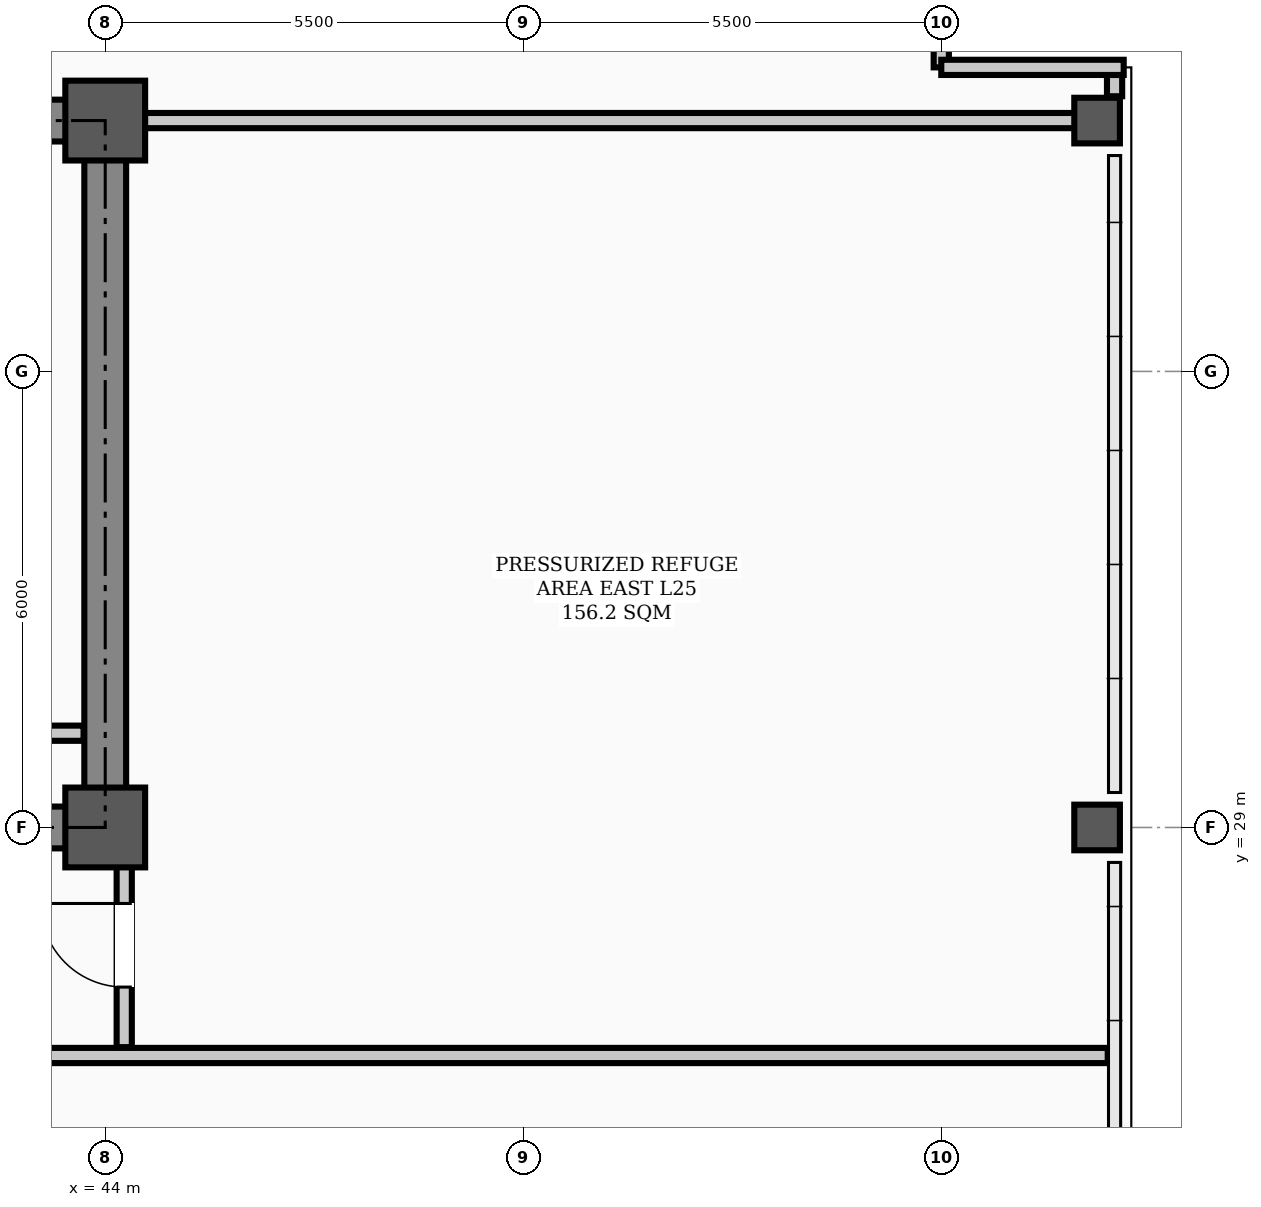
"""IFC4 building model, lengths in metres.
Left out: names, types, materials, properties, quantities, classifications, styles, units other than length and angle.
Written with IfcOpenShell. Run it as: python <this file> out.ifc"""

import sys

from ifc_helpers import new_model, si_unit, direction, frame, frame_2d, origin, origin_2d, place, context, subcontext, project, spatial, rectangle, hollow_rectangle, extrude, element, fill, save


model = new_model("IFC4")
c1 = context("Model", 3, precision=1e-05, world=origin(), true_north=direction((0.0, 1.0)))
c2 = subcontext(c1, "Body", "Model", "MODEL_VIEW")
j1 = project(units=[si_unit("LENGTHUNIT", "METRE"), si_unit("PLANEANGLEUNIT", "RADIAN")], contexts=[c1])
p1 = place(None, origin())
s1 = spatial("IfcSite", under=j1, at=p1, CompositionType="ELEMENT")
p2 = place(p1, origin())
s2 = spatial("IfcBuilding", under=s1, at=p2, CompositionType="ELEMENT")
p3 = place(p2, frame((0.0, 0.0, 100.6)))
s3 = spatial("IfcBuildingStorey", under=s2, at=p3, CompositionType="ELEMENT", Elevation=100.6)
for number, where, z_axis, x_axis in (
    (1, (44.0, 29.0, 0.0), (0.0, 0.0, 1.0), (1.0, 0.0, 0.0)),
    (2, (44.0, 38.3, 0.0), (0.0, 0.0, 1.0), (1.0, 0.0, 0.0)),
):
    element("IfcColumn", number, at=place(p3, frame(where, z_axis=z_axis, x_axis=x_axis)), inside=s3, PredefinedType="COLUMN", context=c2, shape_type="SweptSolid", body=[
        extrude(hollow_rectangle(XDim=1.05, YDim=1.05, WallThickness=0.038, InnerFilletRadius=0.019, OuterFilletRadius=0.057, at=origin_2d()), origin(), (0.0, 0.0, 1.0), 5.4),
    ])
for number, where, z_axis, x_axis in (
    (3, (57.05, 29.0, 0.0), (0.0, 0.0, 1.0), (1.0, 0.0, 0.0)),
    (4, (57.05, 38.3, 0.0), (0.0, 0.0, 1.0), (1.0, 0.0, 0.0)),
):
    element("IfcColumn", number, at=place(p3, frame(where, z_axis=z_axis, x_axis=x_axis)), inside=s3, PredefinedType="COLUMN", context=c2, shape_type="SweptSolid", body=[
        extrude(hollow_rectangle(XDim=0.6, YDim=0.6, WallThickness=0.026, InnerFilletRadius=0.013, OuterFilletRadius=0.039, at=origin_2d()), origin(), (0.0, 0.0, 1.0), 5.4),
    ])
p4 = place(p3, frame((57.28, 38.62, 0.0), z_axis=(0.0, 0.0, 1.0), x_axis=(0.0, 1.0, 0.0)))
e5 = element("IfcWall", 5, at=p4, inside=s3, PredefinedType="PARAPET", context=c2, shape_type="SweptSolid", body=[
    extrude(rectangle(XDim=0.28, YDim=0.2, at=frame_2d((0.14, 0.0))), origin(), (0.0, 0.0, 1.0), 1.2),
])
for number, where, z_axis, x_axis in (
    (6, (55.0, 41.4, 0.0), (0.0, 0.0, 1.0), (0.0, -1.0, 0.0)),
    (7, (55.0, 39.0, 0.0), (0.0, 0.0, 1.0), (1.0, 0.0, 0.0)),
):
    element("IfcWall", number, at=place(p3, frame(where, z_axis=z_axis, x_axis=x_axis)), inside=s3, PredefinedType="PARAPET", context=c2, shape_type="SweptSolid", body=[
        extrude(rectangle(XDim=2.4, YDim=0.2, at=frame_2d((1.2, 0.0))), origin(), (0.0, 0.0, 1.0), 1.2),
    ])
p5 = place(p3, frame((13.5, 29.0, 0.0), z_axis=(0.0, 0.0, 1.0), x_axis=(1.0, 0.0, 0.0)))
e8 = element("IfcWall", 8, at=p5, inside=s3, PredefinedType="SHEAR", context=c2, shape_type="SweptSolid", body=[
    extrude(rectangle(XDim=30.5, YDim=0.55, at=frame_2d((15.25, 0.0))), origin(), (0.0, 0.0, 1.0), 5.22),
])
p6 = place(p5, frame((1.75, 0.0, 0.0)))
e9 = element("IfcOpeningElement", 9, at=p6, cuts=e8, PredefinedType="OPENING", context=c2, shape_type="SweptSolid", body=[
    extrude(rectangle(XDim=1.1, YDim=2.08, at=frame_2d((0.55, 1.04))), frame((0.0, 0.285, 0.0), z_axis=(0.0, -1.0, 0.0), x_axis=(1.0, 0.0, 0.0)), (0.0, 0.0, 1.0), 0.57),
])
p7 = place(p5, frame((26.7, 0.0, 0.0)))
e10 = element("IfcOpeningElement", 10, at=p7, cuts=e8, PredefinedType="OPENING", context=c2, shape_type="SweptSolid", body=[
    extrude(rectangle(XDim=1.1, YDim=2.08, at=frame_2d((0.55, 1.04))), frame((0.0, 0.285, 0.0), z_axis=(0.0, -1.0, 0.0), x_axis=(1.0, 0.0, 0.0)), (0.0, 0.0, 1.0), 0.57),
])
p8 = place(p5, frame((6.8, 0.0, 0.0)))
e11 = element("IfcOpeningElement", 11, at=p8, cuts=e8, PredefinedType="OPENING", context=c2, shape_type="SweptSolid", body=[
    extrude(rectangle(XDim=1.1, YDim=2.08, at=frame_2d((0.55, 1.04))), frame((0.0, 0.285, 0.0), z_axis=(0.0, -1.0, 0.0), x_axis=(1.0, 0.0, 0.0)), (0.0, 0.0, 1.0), 0.57),
])
p9 = place(p5, frame((13.2, 0.0, 0.0)))
e12 = element("IfcOpeningElement", 12, at=p9, cuts=e8, PredefinedType="OPENING", context=c2, shape_type="SweptSolid", body=[
    extrude(rectangle(XDim=1.6, YDim=2.08, at=frame_2d((0.8, 1.04))), frame((0.0, 0.285, 0.0), z_axis=(0.0, -1.0, 0.0), x_axis=(1.0, 0.0, 0.0)), (0.0, 0.0, 1.0), 0.57),
])
p10 = place(p5, frame((19.5, 0.0, 0.0)))
e13 = element("IfcOpeningElement", 13, at=p10, cuts=e8, PredefinedType="OPENING", context=c2, shape_type="SweptSolid", body=[
    extrude(rectangle(XDim=0.9, YDim=2.08, at=frame_2d((0.45, 1.04))), frame((0.0, 0.285, 0.0), z_axis=(0.0, -1.0, 0.0), x_axis=(1.0, 0.0, 0.0)), (0.0, 0.0, 1.0), 0.57),
])
p11 = place(p5, frame((21.55, 0.0, 0.0)))
e14 = element("IfcOpeningElement", 14, at=p11, cuts=e8, PredefinedType="OPENING", context=c2, shape_type="SweptSolid", body=[
    extrude(rectangle(XDim=0.9, YDim=2.08, at=frame_2d((0.45, 1.04))), frame((0.0, 0.285, 0.0), z_axis=(0.0, -1.0, 0.0), x_axis=(1.0, 0.0, 0.0)), (0.0, 0.0, 1.0), 0.57),
])
p12 = place(p3, frame((13.5, 38.3, 0.0), z_axis=(0.0, 0.0, 1.0), x_axis=(1.0, 0.0, 0.0)))
e15 = element("IfcWall", 15, at=p12, inside=s3, PredefinedType="SHEAR", context=c2, shape_type="SweptSolid", body=[
    extrude(rectangle(XDim=30.5, YDim=0.55, at=frame_2d((15.25, 0.0))), origin(), (0.0, 0.0, 1.0), 5.22),
])
p13 = place(p3, frame((44.0, 29.35, 0.0), z_axis=(0.0, 0.0, 1.0), x_axis=(0.0, 1.0, 0.0)))
e16 = element("IfcWall", 16, at=p13, inside=s3, PredefinedType="SHEAR", context=c2, shape_type="SweptSolid", body=[
    extrude(rectangle(XDim=8.6, YDim=0.55, at=frame_2d((4.3, 0.0))), origin(), (0.0, 0.0, 1.0), 5.22),
])
p14 = place(p3, frame((42.4, 30.24, 0.0), z_axis=(0.0, 0.0, 1.0), x_axis=(1.0, 0.0, 0.0)))
e17 = element("IfcWall", 17, at=p14, inside=s3, PredefinedType="STANDARD", context=c2, shape_type="SweptSolid", body=[
    extrude(rectangle(XDim=1.315, YDim=0.2, at=frame_2d((0.658, 0.0))), origin(), (0.0, 0.0, 1.0), 4.6),
])
p15 = place(p3, frame((7.81, 26.0, 0.0), z_axis=(0.0, 0.0, 1.0), x_axis=(1.0, 0.0, 0.0)))
e18 = element("IfcWall", 18, at=p15, inside=s3, PredefinedType="STANDARD", context=c2, shape_type="SweptSolid", body=[
    extrude(rectangle(XDim=49.38, YDim=0.2, at=frame_2d((24.69, 0.0))), origin(), (0.0, 0.0, 1.0), 4.6),
])
p16 = place(p15, frame((10.84, 0.0, 0.0)))
e19 = element("IfcOpeningElement", 19, at=p16, cuts=e18, PredefinedType="OPENING", context=c2, shape_type="SweptSolid", body=[
    extrude(rectangle(XDim=1.1, YDim=2.08, at=frame_2d((0.55, 1.04))), frame((0.0, 0.11, 0.0), z_axis=(0.0, -1.0, 0.0), x_axis=(1.0, 0.0, 0.0)), (0.0, 0.0, 1.0), 0.22),
])
p17 = place(p15, frame((18.89, 0.0, 0.0)))
e20 = element("IfcOpeningElement", 20, at=p17, cuts=e18, PredefinedType="OPENING", context=c2, shape_type="SweptSolid", body=[
    extrude(rectangle(XDim=1.6, YDim=2.08, at=frame_2d((0.8, 1.04))), frame((0.0, 0.11, 0.0), z_axis=(0.0, -1.0, 0.0), x_axis=(1.0, 0.0, 0.0)), (0.0, 0.0, 1.0), 0.22),
])
p18 = place(p15, frame((25.89, 0.0, 0.0)))
e21 = element("IfcOpeningElement", 21, at=p18, cuts=e18, PredefinedType="OPENING", context=c2, shape_type="SweptSolid", body=[
    extrude(rectangle(XDim=1.1, YDim=2.08, at=frame_2d((0.55, 1.04))), frame((0.0, 0.11, 0.0), z_axis=(0.0, -1.0, 0.0), x_axis=(1.0, 0.0, 0.0)), (0.0, 0.0, 1.0), 0.22),
])
p19 = place(p15, frame((32.39, 0.0, 0.0)))
e22 = element("IfcOpeningElement", 22, at=p19, cuts=e18, PredefinedType="OPENING", context=c2, shape_type="SweptSolid", body=[
    extrude(rectangle(XDim=1.1, YDim=2.08, at=frame_2d((0.55, 1.04))), frame((0.0, 0.11, 0.0), z_axis=(0.0, -1.0, 0.0), x_axis=(1.0, 0.0, 0.0)), (0.0, 0.0, 1.0), 0.22),
])
p20 = place(p3, frame((44.0, 38.3, 0.0), z_axis=(0.0, 0.0, 1.0), x_axis=(1.0, 0.0, 0.0)))
e23 = element("IfcWall", 23, at=p20, inside=s3, PredefinedType="STANDARD", context=c2, shape_type="SweptSolid", body=[
    extrude(rectangle(XDim=13.19, YDim=0.2, at=frame_2d((6.595, 0.0))), origin(), (0.0, 0.0, 1.0), 4.5),
])
p21 = place(p3, frame((44.25, 26.11, 0.0), z_axis=(0.0, 0.0, 1.0), x_axis=(0.0, 1.0, 0.0)))
e24 = element("IfcWall", 24, at=p21, inside=s3, PredefinedType="STANDARD", context=c2, shape_type="SweptSolid", body=[
    extrude(rectangle(XDim=3.24, YDim=0.2, at=frame_2d((1.62, 0.0))), origin(), (0.0, 0.0, 1.0), 4.5),
])
p22 = place(p21, frame((0.79, 0.0, 0.0)))
e25 = element("IfcOpeningElement", 25, at=p22, cuts=e24, PredefinedType="OPENING", context=c2, shape_type="SweptSolid", body=[
    extrude(rectangle(XDim=1.1, YDim=2.08, at=frame_2d((0.55, 1.04))), frame((0.0, 0.11, 0.0), z_axis=(0.0, -1.0, 0.0), x_axis=(1.0, 0.0, 0.0)), (0.0, 0.0, 1.0), 0.22),
])
p23 = place(p22, origin())
e26 = element("IfcDoor", 26, at=p23, inside=s3, OperationType="SINGLE_SWING_RIGHT", PredefinedType="DOOR", context=c2, shape_type="SweptSolid", body=[
    extrude(rectangle(XDim=1.1, YDim=2.08, at=frame_2d((0.55, 1.04))), frame((0.0, 0.025, 0.0), z_axis=(0.0, -1.0, 0.0), x_axis=(1.0, 0.0, 0.0)), (0.0, 0.0, 1.0), 0.05),
])
fill(e25, e26)
save(model, sys.argv[1])
